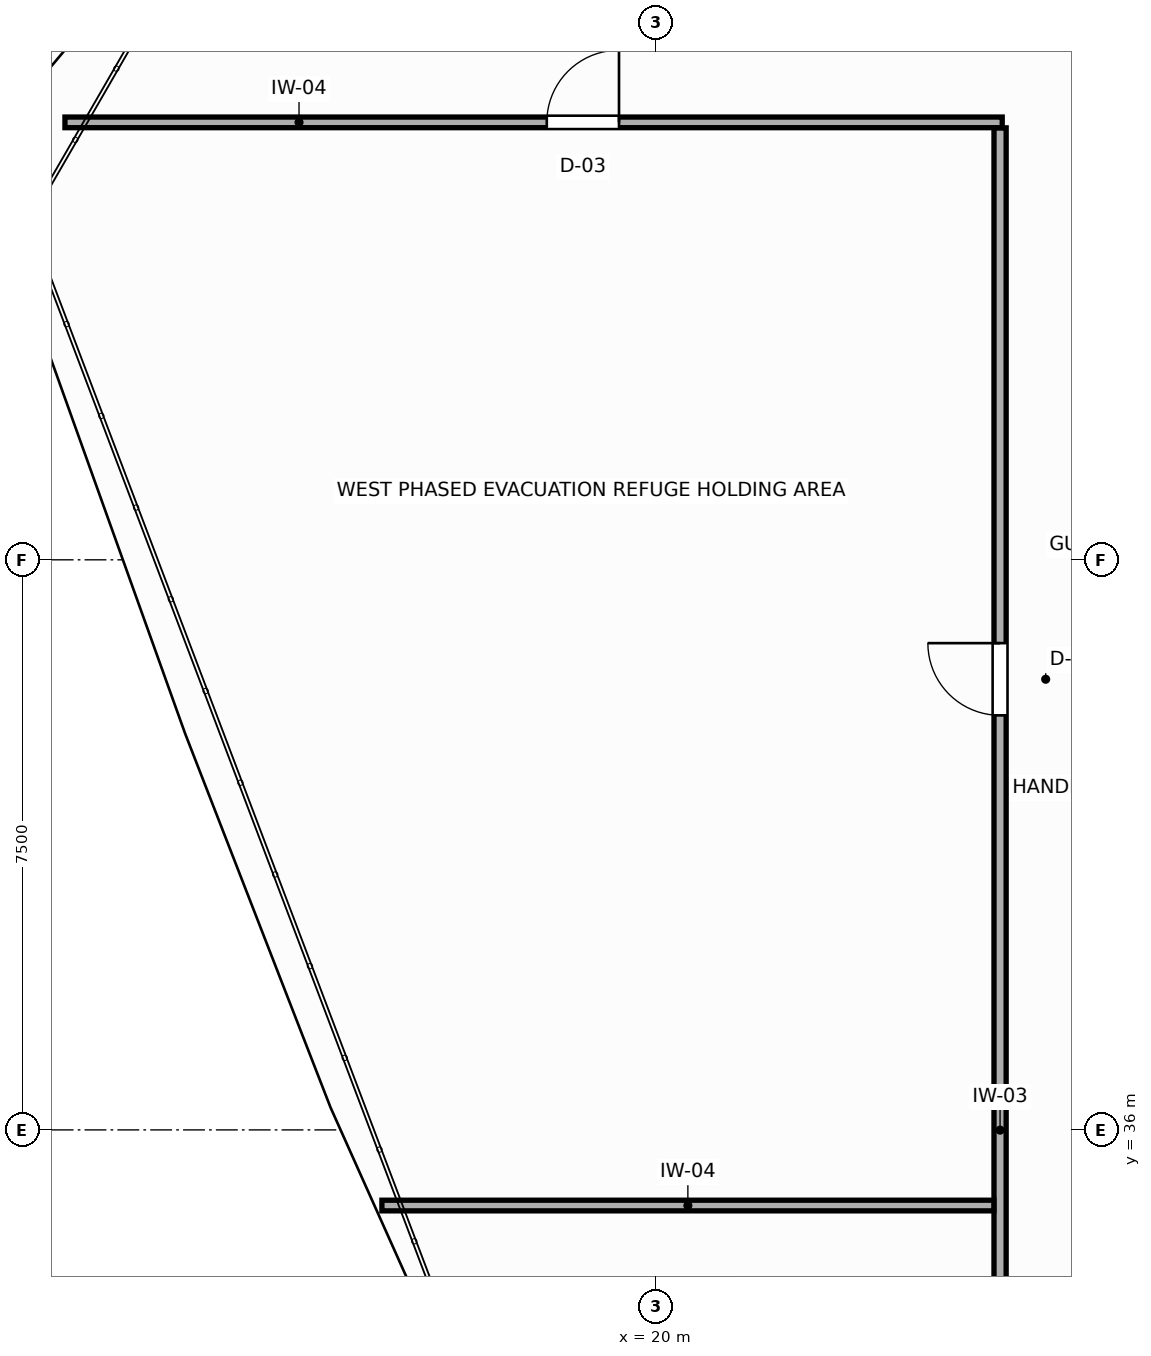
"""IFC4 building model, lengths in metres.
Left out: names, types, materials, properties, quantities, classifications, styles, units other than length and angle.
Written with IfcOpenShell. Run it as: python <this file> out.ifc"""

import sys

from ifc_helpers import new_model, si_unit, direction, frame, frame_2d, origin, place, context, subcontext, project, spatial, rectangle, extrude, element, fill, save


model = new_model("IFC4")
c1 = context("Model", 3, precision=1e-05, world=origin(), true_north=direction((0.0, 1.0)))
c2 = subcontext(c1, "Body", "Model", "MODEL_VIEW")
j1 = project(units=[si_unit("LENGTHUNIT", "METRE"), si_unit("PLANEANGLEUNIT", "RADIAN")], contexts=[c1])
p1 = place(None, origin())
s1 = spatial("IfcSite", under=j1, at=p1, CompositionType="ELEMENT")
p2 = place(p1, origin())
s2 = spatial("IfcBuilding", under=s1, at=p2, CompositionType="ELEMENT")
p3 = place(p2, frame((0.0, 0.0, 131.4)))
s3 = spatial("IfcBuildingStorey", under=s2, at=p3, CompositionType="ELEMENT", Elevation=131.4)
p4 = place(p3, frame((24.525, 30.72, 0.0), z_axis=(0.0, 0.0, 1.0), x_axis=(0.0, 1.0, 0.0)))
e1 = element("IfcWall", 1, at=p4, inside=s3, PredefinedType="PARTITIONING", context=c2, shape_type="SweptSolid", body=[
    extrude(rectangle(XDim=18.463, YDim=0.16, at=frame_2d((9.231, 0.0))), origin(), (0.0, 0.0, 1.0), 4.6),
])
p5 = place(p4, frame((10.734, 0.0, 0.0)))
e2 = element("IfcOpeningElement", 2, at=p5, cuts=e1, PredefinedType="OPENING", context=c2, shape_type="SweptSolid", body=[
    extrude(rectangle(XDim=0.95, YDim=2.05, at=frame_2d((0.475, 1.025))), frame((0.0, 0.09, 0.0), z_axis=(0.0, -1.0, 0.0), x_axis=(1.0, 0.0, 0.0)), (0.0, 0.0, 1.0), 0.18),
])
p6 = place(p3, frame((12.222, 49.255, 0.0), z_axis=(0.0, 0.0, 1.0), x_axis=(1.0, 0.0, 0.0)))
e3 = element("IfcWall", 3, at=p6, inside=s3, PredefinedType="PARTITIONING", context=c2, shape_type="SweptSolid", body=[
    extrude(rectangle(XDim=12.331, YDim=0.14, at=frame_2d((6.166, 0.0))), origin(), (0.0, 0.0, 1.0), 2.97),
])
p7 = place(p6, frame((6.339, 0.0, 0.0)))
e4 = element("IfcOpeningElement", 4, at=p7, cuts=e3, PredefinedType="OPENING", context=c2, shape_type="SweptSolid", body=[
    extrude(rectangle(XDim=0.95, YDim=2.05, at=frame_2d((0.475, 1.025))), frame((0.0, 0.08, 0.0), z_axis=(0.0, -1.0, 0.0), x_axis=(1.0, 0.0, 0.0)), (0.0, 0.0, 1.0), 0.16),
])
p8 = place(p3, frame((16.392, 35.005, 0.0), z_axis=(0.0, 0.0, 1.0), x_axis=(1.0, 0.0, 0.0)))
e5 = element("IfcWall", 5, at=p8, inside=s3, PredefinedType="PARTITIONING", context=c2, shape_type="SweptSolid", body=[
    extrude(rectangle(XDim=8.051, YDim=0.14, at=frame_2d((4.025, 0.0))), origin(), (0.0, 0.0, 1.0), 4.6),
])
p9 = place(p5, origin())
e6 = element("IfcDoor", 6, at=p9, inside=s3, OperationType="SINGLE_SWING_RIGHT", PredefinedType="DOOR", context=c2, shape_type="SweptSolid", body=[
    extrude(rectangle(XDim=0.95, YDim=2.05, at=frame_2d((0.475, 1.025))), frame((0.0, 0.025, 0.0), z_axis=(0.0, -1.0, 0.0), x_axis=(1.0, 0.0, 0.0)), (0.0, 0.0, 1.0), 0.05),
])
fill(e2, e6)
p10 = place(p7, origin())
e7 = element("IfcDoor", 7, at=p10, inside=s3, OperationType="SINGLE_SWING_RIGHT", PredefinedType="DOOR", context=c2, shape_type="SweptSolid", body=[
    extrude(rectangle(XDim=0.95, YDim=2.05, at=frame_2d((0.475, 1.025))), frame((0.0, 0.025, 0.0), z_axis=(0.0, -1.0, 0.0), x_axis=(1.0, 0.0, 0.0)), (0.0, 0.0, 1.0), 0.05),
])
fill(e4, e7)
save(model, sys.argv[1])
